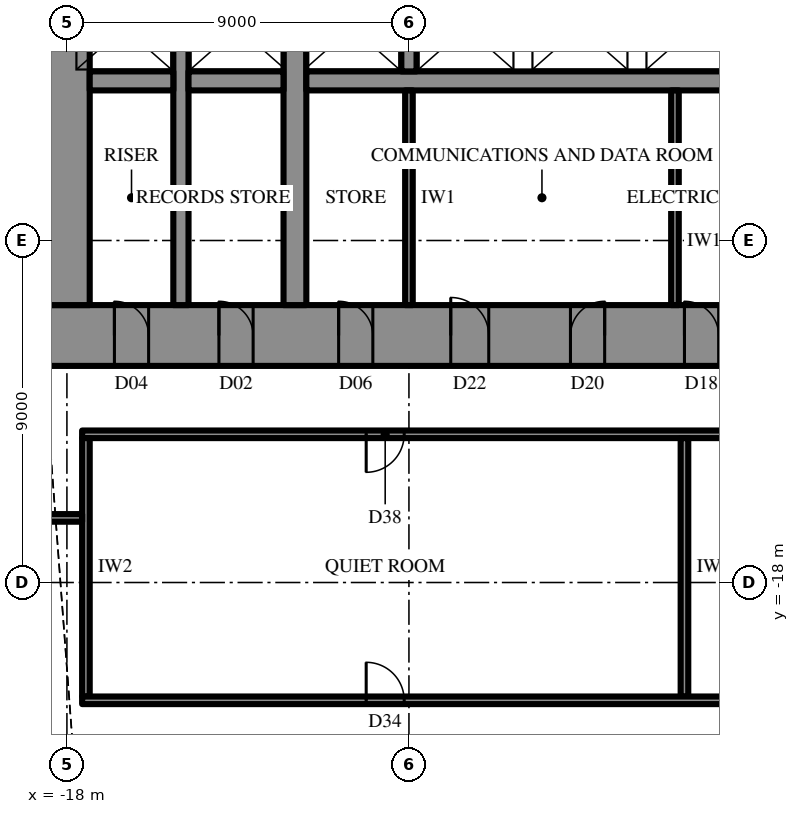
"""IFC4 building model, lengths in metres.
Left out: names, types, materials, properties, quantities, classifications, styles, units other than length and angle.
Written with IfcOpenShell. Run it as: python <this file> out.ifc"""

import sys

from ifc_helpers import new_model, si_unit, direction, frame, frame_2d, origin, place, context, subcontext, project, spatial, rectangle, extrude, element, fill, save


model = new_model("IFC4")
c1 = context("Model", 3, precision=1e-05, world=origin(), true_north=direction((0.0, 1.0)))
c2 = subcontext(c1, "Body", "Model", "MODEL_VIEW")
j1 = project(units=[si_unit("LENGTHUNIT", "METRE"), si_unit("PLANEANGLEUNIT", "RADIAN")], contexts=[c1])
p1 = place(None, origin())
s1 = spatial("IfcSite", under=j1, at=p1, CompositionType="ELEMENT")
p2 = place(p1, origin())
s2 = spatial("IfcBuilding", under=s1, at=p2, CompositionType="ELEMENT")
p3 = place(p2, frame((0.0, 0.0, 114.5)))
s3 = spatial("IfcBuildingStorey", under=s2, at=p3, CompositionType="ELEMENT", Elevation=114.5)
p4 = place(p3, frame((18.6, -11.5, 0.0), z_axis=(0.0, 0.0, 1.0), x_axis=(-1.0, 0.0, 0.0)))
e1 = element("IfcWall", 1, at=p4, inside=s3, PredefinedType="SHEAR", context=c2, shape_type="SweptSolid", body=[
    extrude(rectangle(XDim=37.2, YDim=1.6, at=frame_2d((18.6, 0.0))), origin(), (0.0, 0.0, 1.0), 5.0),
])
p5 = place(p4, frame((19.45, 0.0, 0.0)))
e2 = element("IfcOpeningElement", 2, at=p5, cuts=e1, PredefinedType="OPENING", context=c2, shape_type="SweptSolid", body=[
    extrude(rectangle(XDim=0.9, YDim=2.2, at=frame_2d((0.45, 1.1))), frame((0.0, 0.81, 0.0), z_axis=(0.0, -1.0, 0.0), x_axis=(1.0, 0.0, 0.0)), (0.0, 0.0, 1.0), 1.62),
])
p6 = place(p4, frame((22.45, 0.0, 0.0)))
e3 = element("IfcOpeningElement", 3, at=p6, cuts=e1, PredefinedType="OPENING", context=c2, shape_type="SweptSolid", body=[
    extrude(rectangle(XDim=0.9, YDim=2.2, at=frame_2d((0.45, 1.1))), frame((0.0, 0.81, 0.0), z_axis=(0.0, -1.0, 0.0), x_axis=(1.0, 0.0, 0.0)), (0.0, 0.0, 1.0), 1.62),
])
p7 = place(p4, frame((25.5, 0.0, 0.0)))
e4 = element("IfcOpeningElement", 4, at=p7, cuts=e1, PredefinedType="OPENING", context=c2, shape_type="SweptSolid", body=[
    extrude(rectangle(XDim=1.0, YDim=2.2, at=frame_2d((0.5, 1.1))), frame((0.0, 0.81, 0.0), z_axis=(0.0, -1.0, 0.0), x_axis=(1.0, 0.0, 0.0)), (0.0, 0.0, 1.0), 1.62),
])
p8 = place(p4, frame((1.85, 0.0, 0.0)))
e5 = element("IfcOpeningElement", 5, at=p8, cuts=e1, PredefinedType="OPENING", context=c2, shape_type="SweptSolid", body=[
    extrude(rectangle(XDim=0.9, YDim=2.2, at=frame_2d((0.45, 1.1))), frame((0.0, 0.81, 0.0), z_axis=(0.0, -1.0, 0.0), x_axis=(1.0, 0.0, 0.0)), (0.0, 0.0, 1.0), 1.62),
])
p9 = place(p4, frame((4.6, 0.0, 0.0)))
e6 = element("IfcOpeningElement", 6, at=p9, cuts=e1, PredefinedType="OPENING", context=c2, shape_type="SweptSolid", body=[
    extrude(rectangle(XDim=0.9, YDim=2.2, at=frame_2d((0.45, 1.1))), frame((0.0, 0.81, 0.0), z_axis=(0.0, -1.0, 0.0), x_axis=(1.0, 0.0, 0.0)), (0.0, 0.0, 1.0), 1.62),
])
p10 = place(p4, frame((7.75, 0.0, 0.0)))
e7 = element("IfcOpeningElement", 7, at=p10, cuts=e1, PredefinedType="OPENING", context=c2, shape_type="SweptSolid", body=[
    extrude(rectangle(XDim=0.9, YDim=2.2, at=frame_2d((0.45, 1.1))), frame((0.0, 0.81, 0.0), z_axis=(0.0, -1.0, 0.0), x_axis=(1.0, 0.0, 0.0)), (0.0, 0.0, 1.0), 1.62),
])
p11 = place(p4, frame((28.55, 0.0, 0.0)))
e8 = element("IfcOpeningElement", 8, at=p11, cuts=e1, PredefinedType="OPENING", context=c2, shape_type="SweptSolid", body=[
    extrude(rectangle(XDim=0.9, YDim=2.2, at=frame_2d((0.45, 1.1))), frame((0.0, 0.81, 0.0), z_axis=(0.0, -1.0, 0.0), x_axis=(1.0, 0.0, 0.0)), (0.0, 0.0, 1.0), 1.62),
])
p12 = place(p4, frame((31.7, 0.0, 0.0)))
e9 = element("IfcOpeningElement", 9, at=p12, cuts=e1, PredefinedType="OPENING", context=c2, shape_type="SweptSolid", body=[
    extrude(rectangle(XDim=0.9, YDim=2.2, at=frame_2d((0.45, 1.1))), frame((0.0, 0.81, 0.0), z_axis=(0.0, -1.0, 0.0), x_axis=(1.0, 0.0, 0.0)), (0.0, 0.0, 1.0), 1.62),
])
p13 = place(p4, frame((34.45, 0.0, 0.0)))
e10 = element("IfcOpeningElement", 10, at=p13, cuts=e1, PredefinedType="OPENING", context=c2, shape_type="SweptSolid", body=[
    extrude(rectangle(XDim=0.9, YDim=2.2, at=frame_2d((0.45, 1.1))), frame((0.0, 0.81, 0.0), z_axis=(0.0, -1.0, 0.0), x_axis=(1.0, 0.0, 0.0)), (0.0, 0.0, 1.0), 1.62),
])
p14 = place(p3, frame((-18.0, 10.7, 0.0), z_axis=(0.0, 0.0, 1.0), x_axis=(0.0, -1.0, 0.0)))
e11 = element("IfcWall", 11, at=p14, inside=s3, PredefinedType="SHEAR", context=c2, shape_type="SweptSolid", body=[
    extrude(rectangle(XDim=21.4, YDim=1.2, at=frame_2d((10.7, 0.0))), origin(), (0.0, 0.0, 1.0), 5.0),
])
p15 = place(p14, frame((9.8, 0.0, 0.0)))
e12 = element("IfcOpeningElement", 12, at=p15, cuts=e11, PredefinedType="OPENING", context=c2, shape_type="SweptSolid", body=[
    extrude(rectangle(XDim=1.8, YDim=2.4, at=frame_2d((0.9, 1.2))), frame((0.0, 0.61, 0.0), z_axis=(0.0, -1.0, 0.0), x_axis=(1.0, 0.0, 0.0)), (0.0, 0.0, 1.0), 1.22),
])
p16 = place(p3, frame((-12.0, -10.7, 0.0), z_axis=(0.0, 0.0, 1.0), x_axis=(0.0, 1.0, 0.0)))
e13 = element("IfcWall", 13, at=p16, inside=s3, PredefinedType="SHEAR", context=c2, shape_type="SweptSolid", body=[
    extrude(rectangle(XDim=21.4, YDim=0.6, at=frame_2d((10.7, 0.0))), origin(), (0.0, 0.0, 1.0), 5.0),
])
p17 = place(p16, frame((9.8, 0.0, 0.0)))
e14 = element("IfcOpeningElement", 14, at=p17, cuts=e13, PredefinedType="OPENING", context=c2, shape_type="SweptSolid", body=[
    extrude(rectangle(XDim=1.8, YDim=2.4, at=frame_2d((0.9, 1.2))), frame((0.0, 0.31, 0.0), z_axis=(0.0, -1.0, 0.0), x_axis=(1.0, 0.0, 0.0)), (0.0, 0.0, 1.0), 0.62),
])
p18 = place(p3, frame((-15.0, -10.7, 0.0), z_axis=(0.0, 0.0, 1.0), x_axis=(0.0, 1.0, 0.0)))
e15 = element("IfcWall", 15, at=p18, inside=s3, PredefinedType="SHEAR", context=c2, shape_type="SweptSolid", body=[
    extrude(rectangle(XDim=21.4, YDim=0.4, at=frame_2d((10.7, 0.0))), origin(), (0.0, 0.0, 1.0), 5.0),
])
p19 = place(p18, frame((9.8, 0.0, 0.0)))
e16 = element("IfcOpeningElement", 16, at=p19, cuts=e15, PredefinedType="OPENING", context=c2, shape_type="SweptSolid", body=[
    extrude(rectangle(XDim=1.8, YDim=2.4, at=frame_2d((0.9, 1.2))), frame((0.0, 0.21, 0.0), z_axis=(0.0, -1.0, 0.0), x_axis=(1.0, 0.0, 0.0)), (0.0, 0.0, 1.0), 0.42),
])
p20 = place(p3, frame((11.7, -4.8, 0.0), z_axis=(0.0, 0.0, 1.0), x_axis=(-1.0, 0.0, 0.0)))
e17 = element("IfcWall", 17, at=p20, inside=s3, PredefinedType="SHEAR", context=c2, shape_type="SweptSolid", body=[
    extrude(rectangle(XDim=23.4, YDim=0.5, at=frame_2d((11.7, 0.0))), origin(), (0.0, 0.0, 1.0), 5.0),
])
p21 = place(p20, frame((6.6, 0.0, 0.0)))
e18 = element("IfcOpeningElement", 18, at=p21, cuts=e17, PredefinedType="OPENING", context=c2, shape_type="SweptSolid", body=[
    extrude(rectangle(XDim=1.2, YDim=2.2, at=frame_2d((0.6, 1.1))), frame((0.0, 0.26, 0.0), z_axis=(0.0, -1.0, 0.0), x_axis=(1.0, 0.0, 0.0)), (0.0, 0.0, 1.0), 0.52),
])
p22 = place(p20, frame((3.6, 0.0, 0.0)))
e19 = element("IfcOpeningElement", 19, at=p22, cuts=e17, PredefinedType="OPENING", context=c2, shape_type="SweptSolid", body=[
    extrude(rectangle(XDim=1.2, YDim=2.2, at=frame_2d((0.6, 1.1))), frame((0.0, 0.26, 0.0), z_axis=(0.0, -1.0, 0.0), x_axis=(1.0, 0.0, 0.0)), (0.0, 0.0, 1.0), 0.52),
])
p23 = place(p3, frame((-12.3, -4.8, 0.0), z_axis=(0.0, 0.0, 1.0), x_axis=(-1.0, 0.0, 0.0)))
e20 = element("IfcWall", 20, at=p23, inside=s3, PredefinedType="SHEAR", context=c2, shape_type="SweptSolid", body=[
    extrude(rectangle(XDim=2.5, YDim=0.5, at=frame_2d((1.25, 0.0))), origin(), (0.0, 0.0, 1.0), 5.0),
])
p24 = place(p3, frame((-15.2, -4.8, 0.0), z_axis=(0.0, 0.0, 1.0), x_axis=(-1.0, 0.0, 0.0)))
e21 = element("IfcWall", 21, at=p24, inside=s3, PredefinedType="SHEAR", context=c2, shape_type="SweptSolid", body=[
    extrude(rectangle(XDim=2.2, YDim=0.5, at=frame_2d((1.1, 0.0))), origin(), (0.0, 0.0, 1.0), 5.0),
])
p25 = place(p3, frame((-9.0, -2.25, 0.0), z_axis=(0.0, 0.0, 1.0), x_axis=(0.0, -1.0, 0.0)))
e22 = element("IfcWall", 22, at=p25, inside=s3, PredefinedType="SHEAR", context=c2, shape_type="SweptSolid", body=[
    extrude(rectangle(XDim=2.3, YDim=0.4, at=frame_2d((1.15, 0.0))), origin(), (0.0, 0.0, 1.0), 5.0),
])
for number, where, z_axis, x_axis in (
    (23, (-9.0, -5.05, 0.0), (0.0, 0.0, 1.0), (0.0, -1.0, 0.0)),
    (24, (-2.0, -5.05, 0.0), (0.0, 0.0, 1.0), (0.0, -1.0, 0.0)),
):
    element("IfcWall", number, at=place(p3, frame(where, z_axis=z_axis, x_axis=x_axis)), inside=s3, PredefinedType="PARTITIONING", context=c2, shape_type="SweptSolid", body=[
        extrude(rectangle(XDim=5.65, YDim=0.2, at=frame_2d((2.825, 0.0))), origin(), (0.0, 0.0, 1.0), 4.8),
    ])
p26 = place(p3, frame((17.6, -14.1, 0.0), z_axis=(0.0, 0.0, 1.0), x_axis=(-1.0, 0.0, 0.0)))
e25 = element("IfcWall", 25, at=p26, inside=s3, PredefinedType="PARTITIONING", context=c2, shape_type="SweptSolid", body=[
    extrude(rectangle(XDim=35.2, YDim=0.2, at=frame_2d((17.6, 0.0))), origin(), (0.0, 0.0, 1.0), 4.8),
])
p27 = place(p26, frame((8.825, 0.0, 0.0)))
e26 = element("IfcOpeningElement", 26, at=p27, cuts=e25, PredefinedType="OPENING", context=c2, shape_type="SweptSolid", body=[
    extrude(rectangle(XDim=1.8, YDim=2.4, at=frame_2d((0.9, 1.2))), frame((0.0, 0.11, 0.0), z_axis=(0.0, -1.0, 0.0), x_axis=(1.0, 0.0, 0.0)), (0.0, 0.0, 1.0), 0.22),
])
p28 = place(p26, frame((26.725, 0.0, 0.0)))
e27 = element("IfcOpeningElement", 27, at=p28, cuts=e25, PredefinedType="OPENING", context=c2, shape_type="SweptSolid", body=[
    extrude(rectangle(XDim=1.0, YDim=2.2, at=frame_2d((0.5, 1.1))), frame((0.0, 0.11, 0.0), z_axis=(0.0, -1.0, 0.0), x_axis=(1.0, 0.0, 0.0)), (0.0, 0.0, 1.0), 0.22),
])
for number, where, z_axis, x_axis in (
    (28, (-1.75, -14.2, 0.0), (0.0, 0.0, 1.0), (0.0, -1.0, 0.0)),
    (29, (-17.5, -14.2, 0.0), (0.0, 0.0, 1.0), (0.0, -1.0, 0.0)),
):
    element("IfcWall", number, at=place(p3, frame(where, z_axis=z_axis, x_axis=x_axis)), inside=s3, PredefinedType="PARTITIONING", context=c2, shape_type="SweptSolid", body=[
        extrude(rectangle(XDim=6.8, YDim=0.2, at=frame_2d((3.4, 0.0))), origin(), (0.0, 0.0, 1.0), 4.8),
    ])
p29 = place(p3, frame((17.6, -21.1, 0.0), z_axis=(0.0, 0.0, 1.0), x_axis=(-1.0, 0.0, 0.0)))
e30 = element("IfcWall", 30, at=p29, inside=s3, PredefinedType="PARTITIONING", context=c2, shape_type="SweptSolid", body=[
    extrude(rectangle(XDim=35.2, YDim=0.2, at=frame_2d((17.6, 0.0))), origin(), (0.0, 0.0, 1.0), 4.8),
])
p30 = place(p29, frame((4.012, 0.0, 0.0)))
e31 = element("IfcOpeningElement", 31, at=p30, cuts=e30, PredefinedType="OPENING", context=c2, shape_type="SweptSolid", body=[
    extrude(rectangle(XDim=1.8, YDim=2.4, at=frame_2d((0.9, 1.2))), frame((0.0, 0.11, 0.0), z_axis=(0.0, -1.0, 0.0), x_axis=(1.0, 0.0, 0.0)), (0.0, 0.0, 1.0), 0.22),
])
p31 = place(p29, frame((13.637, 0.0, 0.0)))
e32 = element("IfcOpeningElement", 32, at=p31, cuts=e30, PredefinedType="OPENING", context=c2, shape_type="SweptSolid", body=[
    extrude(rectangle(XDim=1.8, YDim=2.4, at=frame_2d((0.9, 1.2))), frame((0.0, 0.11, 0.0), z_axis=(0.0, -1.0, 0.0), x_axis=(1.0, 0.0, 0.0)), (0.0, 0.0, 1.0), 0.22),
])
p32 = place(p29, frame((26.725, 0.0, 0.0)))
e33 = element("IfcOpeningElement", 33, at=p32, cuts=e30, PredefinedType="OPENING", context=c2, shape_type="SweptSolid", body=[
    extrude(rectangle(XDim=1.0, YDim=2.2, at=frame_2d((0.5, 1.1))), frame((0.0, 0.11, 0.0), z_axis=(0.0, -1.0, 0.0), x_axis=(1.0, 0.0, 0.0)), (0.0, 0.0, 1.0), 0.22),
])
p33 = place(p3, frame((-17.6, -16.3, 0.0), z_axis=(0.0, 0.0, 1.0), x_axis=(-1.0, 0.0, 0.0)))
e34 = element("IfcWall", 34, at=p33, inside=s3, PredefinedType="PARTITIONING", context=c2, shape_type="SweptSolid", body=[
    extrude(rectangle(XDim=4.9, YDim=0.2, at=frame_2d((2.45, 0.0))), origin(), (0.0, 0.0, 1.0), 4.8),
])
p34 = place(p5, frame((0.9, 0.0, 0.0), z_axis=(0.0, 0.0, 1.0), x_axis=(-1.0, 0.0, 0.0)))
e35 = element("IfcDoor", 35, at=p34, inside=s3, OperationType="SINGLE_SWING_RIGHT", PredefinedType="DOOR", context=c2, shape_type="SweptSolid", body=[
    extrude(rectangle(XDim=0.9, YDim=2.2, at=frame_2d((0.45, 1.1))), frame((0.0, 0.025, 0.0), z_axis=(0.0, -1.0, 0.0), x_axis=(1.0, 0.0, 0.0)), (0.0, 0.0, 1.0), 0.05),
])
fill(e2, e35)
p35 = place(p6, frame((0.9, 0.0, 0.0), z_axis=(0.0, 0.0, 1.0), x_axis=(-1.0, 0.0, 0.0)))
e36 = element("IfcDoor", 36, at=p35, inside=s3, OperationType="SINGLE_SWING_LEFT", PredefinedType="DOOR", context=c2, shape_type="SweptSolid", body=[
    extrude(rectangle(XDim=0.9, YDim=2.2, at=frame_2d((0.45, 1.1))), frame((0.0, 0.025, 0.0), z_axis=(0.0, -1.0, 0.0), x_axis=(1.0, 0.0, 0.0)), (0.0, 0.0, 1.0), 0.05),
])
fill(e3, e36)
p36 = place(p7, frame((1.0, 0.0, 0.0), z_axis=(0.0, 0.0, 1.0), x_axis=(-1.0, 0.0, 0.0)))
e37 = element("IfcDoor", 37, at=p36, inside=s3, OperationType="SINGLE_SWING_RIGHT", PredefinedType="DOOR", context=c2, shape_type="SweptSolid", body=[
    extrude(rectangle(XDim=1.0, YDim=2.2, at=frame_2d((0.5, 1.1))), frame((0.0, 0.025, 0.0), z_axis=(0.0, -1.0, 0.0), x_axis=(1.0, 0.0, 0.0)), (0.0, 0.0, 1.0), 0.05),
])
fill(e4, e37)
p37 = place(p11, frame((0.9, 0.0, 0.0), z_axis=(0.0, 0.0, 1.0), x_axis=(-1.0, 0.0, 0.0)))
e38 = element("IfcDoor", 38, at=p37, inside=s3, OperationType="SINGLE_SWING_RIGHT", PredefinedType="DOOR", context=c2, shape_type="SweptSolid", body=[
    extrude(rectangle(XDim=0.9, YDim=2.2, at=frame_2d((0.45, 1.1))), frame((0.0, 0.025, 0.0), z_axis=(0.0, -1.0, 0.0), x_axis=(1.0, 0.0, 0.0)), (0.0, 0.0, 1.0), 0.05),
])
fill(e8, e38)
p38 = place(p12, frame((0.9, 0.0, 0.0), z_axis=(0.0, 0.0, 1.0), x_axis=(-1.0, 0.0, 0.0)))
e39 = element("IfcDoor", 39, at=p38, inside=s3, OperationType="SINGLE_SWING_RIGHT", PredefinedType="DOOR", context=c2, shape_type="SweptSolid", body=[
    extrude(rectangle(XDim=0.9, YDim=2.2, at=frame_2d((0.45, 1.1))), frame((0.0, 0.025, 0.0), z_axis=(0.0, -1.0, 0.0), x_axis=(1.0, 0.0, 0.0)), (0.0, 0.0, 1.0), 0.05),
])
fill(e9, e39)
p39 = place(p13, frame((0.9, 0.0, 0.0), z_axis=(0.0, 0.0, 1.0), x_axis=(-1.0, 0.0, 0.0)))
e40 = element("IfcDoor", 40, at=p39, inside=s3, OperationType="SINGLE_SWING_RIGHT", PredefinedType="DOOR", context=c2, shape_type="SweptSolid", body=[
    extrude(rectangle(XDim=0.9, YDim=2.2, at=frame_2d((0.45, 1.1))), frame((0.0, 0.025, 0.0), z_axis=(0.0, -1.0, 0.0), x_axis=(1.0, 0.0, 0.0)), (0.0, 0.0, 1.0), 0.05),
])
fill(e10, e40)
p40 = place(p32, frame((1.0, 0.0, 0.0), z_axis=(0.0, 0.0, 1.0), x_axis=(-1.0, 0.0, 0.0)))
e41 = element("IfcDoor", 41, at=p40, inside=s3, OperationType="SINGLE_SWING_RIGHT", PredefinedType="DOOR", context=c2, shape_type="SweptSolid", body=[
    extrude(rectangle(XDim=1.0, YDim=2.2, at=frame_2d((0.5, 1.1))), frame((0.0, 0.025, 0.0), z_axis=(0.0, -1.0, 0.0), x_axis=(1.0, 0.0, 0.0)), (0.0, 0.0, 1.0), 0.05),
])
fill(e33, e41)
p41 = place(p28, origin())
e42 = element("IfcDoor", 42, at=p41, inside=s3, OperationType="SINGLE_SWING_LEFT", PredefinedType="DOOR", context=c2, shape_type="SweptSolid", body=[
    extrude(rectangle(XDim=1.0, YDim=2.2, at=frame_2d((0.5, 1.1))), frame((0.0, 0.025, 0.0), z_axis=(0.0, -1.0, 0.0), x_axis=(1.0, 0.0, 0.0)), (0.0, 0.0, 1.0), 0.05),
])
fill(e27, e42)
save(model, sys.argv[1])
